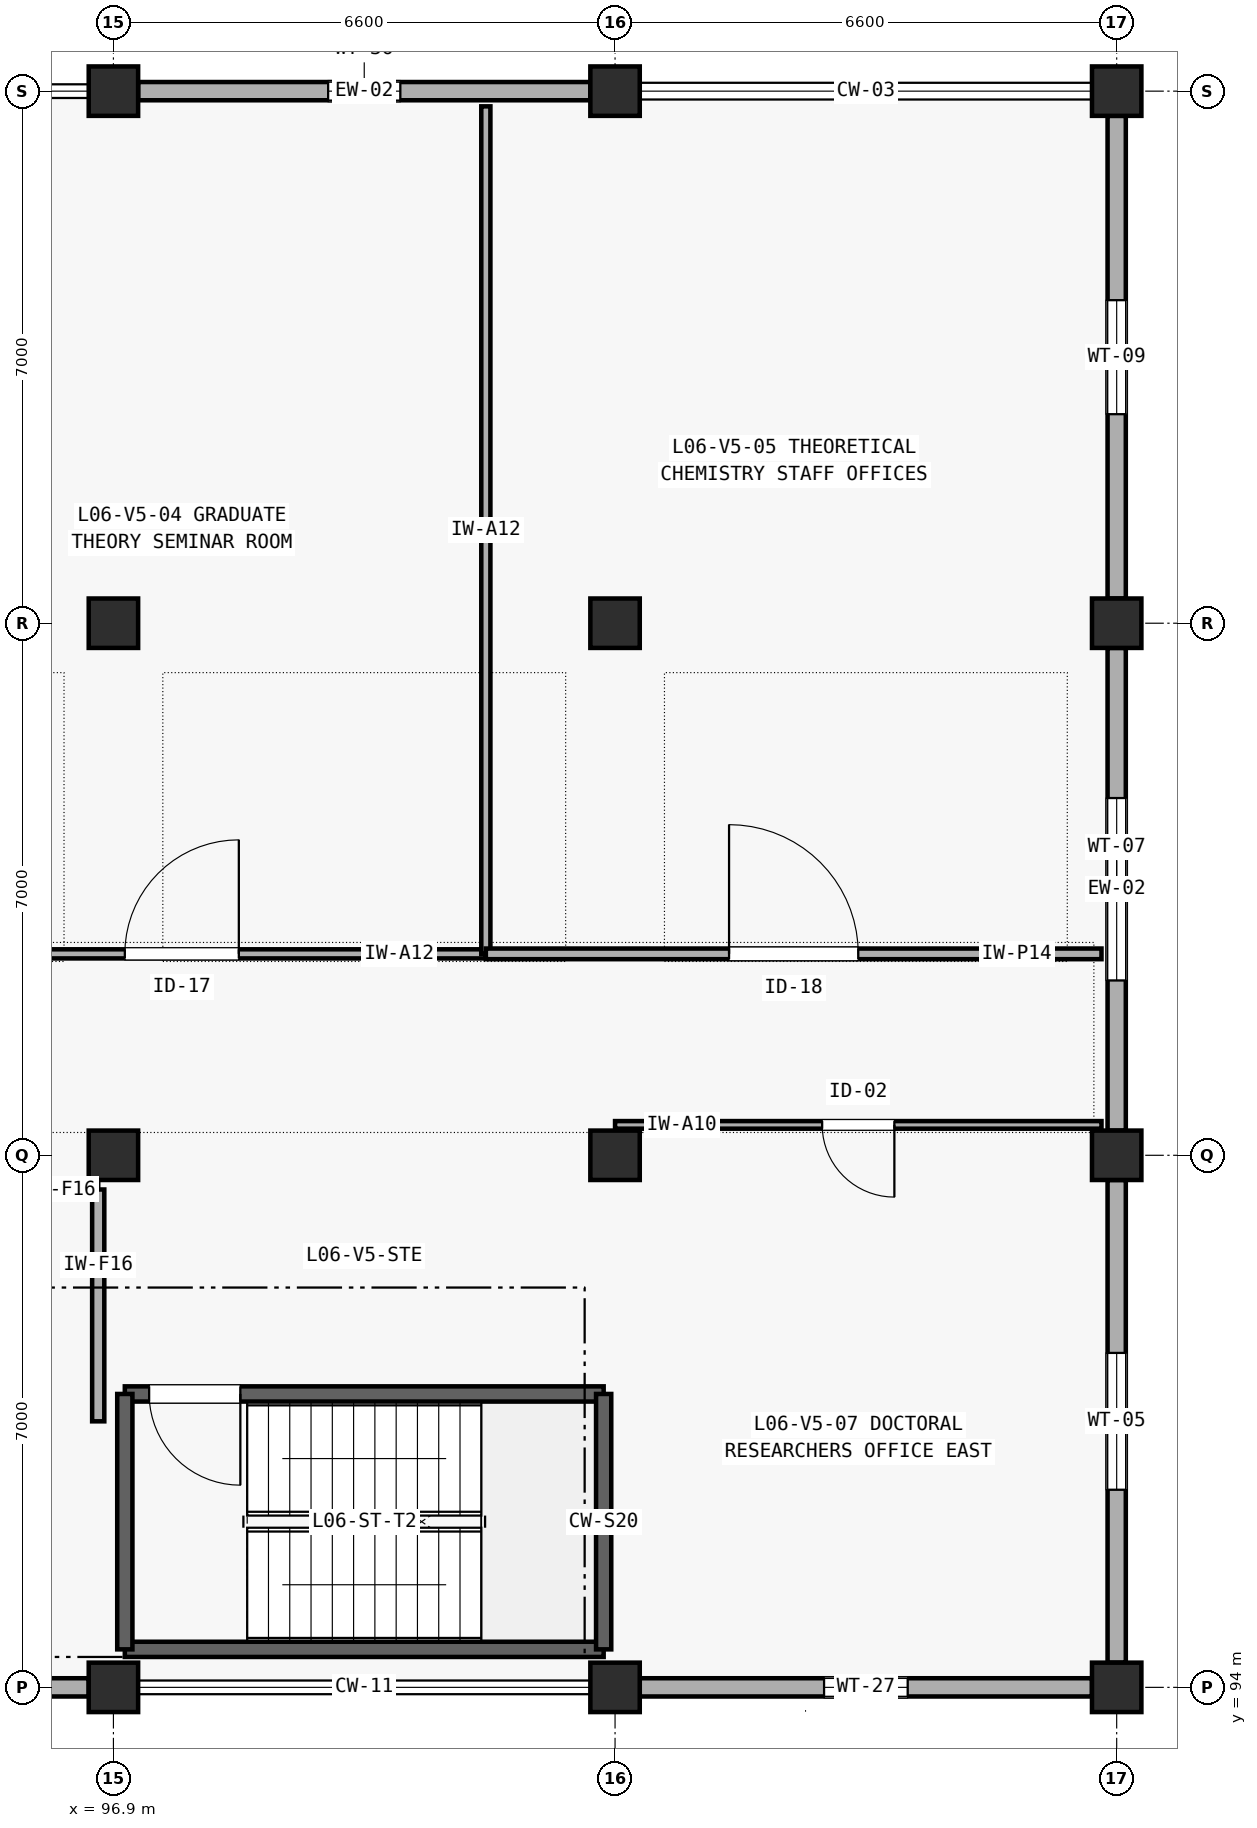
"""IFC4 building model, lengths in metres.
Left out: names, types, materials, properties, quantities, classifications, styles, units other than length and angle.
Written with IfcOpenShell. Run it as: python <this file> out.ifc"""

import sys

from ifc_helpers import new_model, si_unit, direction, frame, frame_2d, origin, origin_2d, place, context, subcontext, project, spatial, rectangle, extrude, element, fill, save


model = new_model("IFC4")
c1 = context("Model", 3, precision=1e-05, world=origin(), true_north=direction((0.0, 1.0)))
c2 = subcontext(c1, "Body", "Model", "MODEL_VIEW")
j1 = project(units=[si_unit("LENGTHUNIT", "METRE"), si_unit("PLANEANGLEUNIT", "RADIAN")], contexts=[c1])
p1 = place(None, origin())
s1 = spatial("IfcSite", under=j1, at=p1, CompositionType="ELEMENT")
p2 = place(p1, origin())
s2 = spatial("IfcBuilding", under=s1, at=p2, CompositionType="ELEMENT")
p3 = place(p2, frame((0.0, 0.0, 25.2)))
s3 = spatial("IfcBuildingStorey", under=s2, at=p3, CompositionType="ELEMENT", Elevation=25.2)
for number, where, z_axis, x_axis in (
    (1, (96.9, 94.0, 0.0), (0.0, 0.0, 1.0), (1.0, 0.0, 0.0)),
    (2, (96.9, 101.0, 0.0), (0.0, 0.0, 1.0), (1.0, 0.0, 0.0)),
    (3, (96.9, 108.0, 0.0), (0.0, 0.0, 1.0), (1.0, 0.0, 0.0)),
    (4, (96.9, 115.0, 0.0), (0.0, 0.0, 1.0), (1.0, 0.0, 0.0)),
    (5, (103.5, 94.0, 0.0), (0.0, 0.0, 1.0), (1.0, 0.0, 0.0)),
    (6, (103.5, 101.0, 0.0), (0.0, 0.0, 1.0), (1.0, 0.0, 0.0)),
    (7, (103.5, 108.0, 0.0), (0.0, 0.0, 1.0), (1.0, 0.0, 0.0)),
    (8, (103.5, 115.0, 0.0), (0.0, 0.0, 1.0), (1.0, 0.0, 0.0)),
    (9, (110.1, 94.0, 0.0), (0.0, 0.0, 1.0), (1.0, 0.0, 0.0)),
    (10, (110.1, 101.0, 0.0), (0.0, 0.0, 1.0), (1.0, 0.0, 0.0)),
    (11, (110.1, 108.0, 0.0), (0.0, 0.0, 1.0), (1.0, 0.0, 0.0)),
    (12, (110.1, 115.0, 0.0), (0.0, 0.0, 1.0), (1.0, 0.0, 0.0)),
):
    element("IfcColumn", number, at=place(p3, frame(where, z_axis=z_axis, x_axis=x_axis)), inside=s3, PredefinedType="COLUMN", context=c2, shape_type="SweptSolid", body=[
        extrude(rectangle(XDim=0.65, YDim=0.65, at=origin_2d()), origin(), (0.0, 0.0, 1.0), 4.2),
    ])
p4 = place(p3, frame((90.625, 94.0, 0.0), z_axis=(0.0, 0.0, 1.0), x_axis=(1.0, 0.0, 0.0)))
e13 = element("IfcWall", 13, at=p4, inside=s3, PredefinedType="SOLIDWALL", context=c2, shape_type="SweptSolid", body=[
    extrude(rectangle(XDim=5.95, YDim=0.24, at=frame_2d((2.975, 0.0))), origin(), (0.0, 0.0, 1.0), 3.235),
])
p5 = place(p4, frame((1.625, 0.0, 0.85)))
e14 = element("IfcOpeningElement", 14, at=p5, cuts=e13, PredefinedType="OPENING", context=c2, shape_type="SweptSolid", body=[
    extrude(rectangle(XDim=2.7, YDim=1.6, at=frame_2d((1.35, 0.8))), frame((0.0, 0.13, 0.0), z_axis=(0.0, -1.0, 0.0), x_axis=(1.0, 0.0, 0.0)), (0.0, 0.0, 1.0), 0.26),
])
p6 = place(p3, frame((103.825, 94.0, 0.0), z_axis=(0.0, 0.0, 1.0), x_axis=(1.0, 0.0, 0.0)))
e15 = element("IfcWall", 15, at=p6, inside=s3, PredefinedType="SOLIDWALL", context=c2, shape_type="SweptSolid", body=[
    extrude(rectangle(XDim=5.95, YDim=0.24, at=frame_2d((2.975, 0.0))), origin(), (0.0, 0.0, 1.0), 3.365),
])
p7 = place(p6, frame((2.425, 0.0, 0.85)))
e16 = element("IfcOpeningElement", 16, at=p7, cuts=e15, PredefinedType="OPENING", context=c2, shape_type="SweptSolid", body=[
    extrude(rectangle(XDim=1.1, YDim=1.45, at=frame_2d((0.55, 0.725))), frame((0.0, 0.13, 0.0), z_axis=(0.0, -1.0, 0.0), x_axis=(1.0, 0.0, 0.0)), (0.0, 0.0, 1.0), 0.26),
])
p8 = place(p3, frame((97.225, 115.0, 0.0), z_axis=(0.0, 0.0, 1.0), x_axis=(1.0, 0.0, 0.0)))
e17 = element("IfcWall", 17, at=p8, inside=s3, PredefinedType="SOLIDWALL", context=c2, shape_type="SweptSolid", body=[
    extrude(rectangle(XDim=5.95, YDim=0.24, at=frame_2d((2.975, 0.0))), origin(), (0.0, 0.0, 1.0), 3.285),
])
p9 = place(p8, frame((2.5, 0.0, 0.85)))
e18 = element("IfcOpeningElement", 18, at=p9, cuts=e17, PredefinedType="OPENING", context=c2, shape_type="SweptSolid", body=[
    extrude(rectangle(XDim=0.95, YDim=1.55, at=frame_2d((0.475, 0.775))), frame((0.0, 0.13, 0.0), z_axis=(0.0, -1.0, 0.0), x_axis=(1.0, 0.0, 0.0)), (0.0, 0.0, 1.0), 0.26),
])
p10 = place(p3, frame((110.1, 94.325, 0.0), z_axis=(0.0, 0.0, 1.0), x_axis=(0.0, 1.0, 0.0)))
e19 = element("IfcWall", 19, at=p10, inside=s3, PredefinedType="SOLIDWALL", context=c2, shape_type="SweptSolid", body=[
    extrude(rectangle(XDim=6.35, YDim=0.24, at=frame_2d((3.175, 0.0))), origin(), (0.0, 0.0, 1.0), 3.565),
])
p11 = place(p10, frame((2.275, 0.0, 0.85)))
e20 = element("IfcOpeningElement", 20, at=p11, cuts=e19, PredefinedType="OPENING", context=c2, shape_type="SweptSolid", body=[
    extrude(rectangle(XDim=1.8, YDim=1.35, at=frame_2d((0.9, 0.675))), frame((0.0, 0.13, 0.0), z_axis=(0.0, -1.0, 0.0), x_axis=(1.0, 0.0, 0.0)), (0.0, 0.0, 1.0), 0.26),
])
p12 = place(p3, frame((110.1, 101.325, 0.0), z_axis=(0.0, 0.0, 1.0), x_axis=(0.0, 1.0, 0.0)))
e21 = element("IfcWall", 21, at=p12, inside=s3, PredefinedType="SOLIDWALL", context=c2, shape_type="SweptSolid", body=[
    extrude(rectangle(XDim=6.35, YDim=0.24, at=frame_2d((3.175, 0.0))), origin(), (0.0, 0.0, 1.0), 3.565),
])
p13 = place(p12, frame((1.975, 0.0, 0.85)))
e22 = element("IfcOpeningElement", 22, at=p13, cuts=e21, PredefinedType="OPENING", context=c2, shape_type="SweptSolid", body=[
    extrude(rectangle(XDim=2.4, YDim=1.35, at=frame_2d((1.2, 0.675))), frame((0.0, 0.13, 0.0), z_axis=(0.0, -1.0, 0.0), x_axis=(1.0, 0.0, 0.0)), (0.0, 0.0, 1.0), 0.26),
])
p14 = place(p3, frame((110.1, 108.325, 0.0), z_axis=(0.0, 0.0, 1.0), x_axis=(0.0, 1.0, 0.0)))
e23 = element("IfcWall", 23, at=p14, inside=s3, PredefinedType="SOLIDWALL", context=c2, shape_type="SweptSolid", body=[
    extrude(rectangle(XDim=6.35, YDim=0.24, at=frame_2d((3.175, 0.0))), origin(), (0.0, 0.0, 1.0), 3.565),
])
p15 = place(p14, frame((2.425, 0.0, 0.85)))
e24 = element("IfcOpeningElement", 24, at=p15, cuts=e23, PredefinedType="OPENING", context=c2, shape_type="SweptSolid", body=[
    extrude(rectangle(XDim=1.5, YDim=1.5, at=frame_2d((0.75, 0.75))), frame((0.0, 0.13, 0.0), z_axis=(0.0, -1.0, 0.0), x_axis=(1.0, 0.0, 0.0)), (0.0, 0.0, 1.0), 0.26),
])
p16 = place(p3, frame((97.05, 94.5, 0.0), z_axis=(0.0, 0.0, 1.0), x_axis=(1.0, 0.0, 0.0)))
e25 = element("IfcWall", 25, at=p16, inside=s3, PredefinedType="SHEAR", context=c2, shape_type="SweptSolid", body=[
    extrude(rectangle(XDim=6.3, YDim=0.2, at=frame_2d((3.15, 0.0))), origin(), (0.0, 0.0, 1.0), 4.2),
])
p17 = place(p3, frame((97.05, 97.86, 0.0), z_axis=(0.0, 0.0, 1.0), x_axis=(1.0, 0.0, 0.0)))
e26 = element("IfcWall", 26, at=p17, inside=s3, PredefinedType="SHEAR", context=c2, shape_type="SweptSolid", body=[
    extrude(rectangle(XDim=6.3, YDim=0.2, at=frame_2d((3.15, 0.0))), origin(), (0.0, 0.0, 1.0), 4.2),
])
p18 = place(p17, frame((0.32, 0.0, 0.0)))
e27 = element("IfcOpeningElement", 27, at=p18, cuts=e26, PredefinedType="OPENING", context=c2, shape_type="SweptSolid", body=[
    extrude(rectangle(XDim=1.2, YDim=2.15, at=frame_2d((0.6, 1.075))), frame((0.0, 0.11, 0.0), z_axis=(0.0, -1.0, 0.0), x_axis=(1.0, 0.0, 0.0)), (0.0, 0.0, 1.0), 0.22),
])
for number, where, z_axis, x_axis in (
    (28, (97.05, 94.5, 0.0), (0.0, 0.0, 1.0), (0.0, 1.0, 0.0)),
    (29, (103.35, 94.5, 0.0), (0.0, 0.0, 1.0), (0.0, 1.0, 0.0)),
):
    element("IfcWall", number, at=place(p3, frame(where, z_axis=z_axis, x_axis=x_axis)), inside=s3, PredefinedType="SHEAR", context=c2, shape_type="SweptSolid", body=[
        extrude(rectangle(XDim=3.36, YDim=0.2, at=frame_2d((1.68, 0.0))), origin(), (0.0, 0.0, 1.0), 4.2),
    ])
p19 = place(p3, frame((91.5, 100.55, 0.0), z_axis=(0.0, 0.0, 1.0), x_axis=(1.0, 0.0, 0.0)))
e30 = element("IfcWall", 30, at=p19, inside=s3, PredefinedType="SOLIDWALL", context=c2, shape_type="SweptSolid", body=[
    extrude(rectangle(XDim=5.2, YDim=0.16, at=frame_2d((2.6, 0.0))), origin(), (0.0, 0.0, 1.0), 3.9),
])
p20 = place(p19, frame((1.95, 0.0, 0.0)))
e31 = element("IfcOpeningElement", 31, at=p20, cuts=e30, PredefinedType="OPENING", context=c2, shape_type="SweptSolid", body=[
    extrude(rectangle(XDim=1.3, YDim=2.15, at=frame_2d((0.65, 1.075))), frame((0.0, 0.09, 0.0), z_axis=(0.0, -1.0, 0.0), x_axis=(1.0, 0.0, 0.0)), (0.0, 0.0, 1.0), 0.18),
])
p21 = place(p3, frame((96.7, 97.5, 0.0), z_axis=(0.0, 0.0, 1.0), x_axis=(0.0, 1.0, 0.0)))
e32 = element("IfcWall", 32, at=p21, inside=s3, PredefinedType="SOLIDWALL", context=c2, shape_type="SweptSolid", body=[
    extrude(rectangle(XDim=3.05, YDim=0.16, at=frame_2d((1.525, 0.0))), origin(), (0.0, 0.0, 1.0), 3.405),
])
p22 = place(p3, frame((93.8, 103.65, 0.0), z_axis=(0.0, 0.0, 1.0), x_axis=(1.0, 0.0, 0.0)))
e33 = element("IfcWall", 33, at=p22, inside=s3, PredefinedType="PARTITIONING", context=c2, shape_type="SweptSolid", body=[
    extrude(rectangle(XDim=8.0, YDim=0.12, at=frame_2d((4.0, 0.0))), origin(), (0.0, 0.0, 1.0), 3.9),
])
p23 = place(p22, frame((3.25, 0.0, 0.0)))
e34 = element("IfcOpeningElement", 34, at=p23, cuts=e33, PredefinedType="OPENING", context=c2, shape_type="SweptSolid", body=[
    extrude(rectangle(XDim=1.5, YDim=2.15, at=frame_2d((0.75, 1.075))), frame((0.0, 0.07, 0.0), z_axis=(0.0, -1.0, 0.0), x_axis=(1.0, 0.0, 0.0)), (0.0, 0.0, 1.0), 0.14),
])
p24 = place(p3, frame((101.8, 103.65, 0.0), z_axis=(0.0, 0.0, 1.0), x_axis=(0.0, 1.0, 0.0)))
e35 = element("IfcWall", 35, at=p24, inside=s3, PredefinedType="PARTITIONING", context=c2, shape_type="SweptSolid", body=[
    extrude(rectangle(XDim=11.15, YDim=0.12, at=frame_2d((5.575, 0.0))), origin(), (0.0, 0.0, 1.0), 3.9),
])
p25 = place(p3, frame((101.8, 103.65, 0.0), z_axis=(0.0, 0.0, 1.0), x_axis=(1.0, 0.0, 0.0)))
e36 = element("IfcWall", 36, at=p25, inside=s3, PredefinedType="PLUMBINGWALL", context=c2, shape_type="SweptSolid", body=[
    extrude(rectangle(XDim=8.1, YDim=0.14, at=frame_2d((4.05, 0.0))), origin(), (0.0, 0.0, 1.0), 3.9),
])
p26 = place(p25, frame((3.2, 0.0, 0.0)))
e37 = element("IfcOpeningElement", 37, at=p26, cuts=e36, PredefinedType="OPENING", context=c2, shape_type="SweptSolid", body=[
    extrude(rectangle(XDim=1.7, YDim=2.2, at=frame_2d((0.85, 1.1))), frame((0.0, 0.08, 0.0), z_axis=(0.0, -1.0, 0.0), x_axis=(1.0, 0.0, 0.0)), (0.0, 0.0, 1.0), 0.16),
])
p27 = place(p3, frame((103.5, 101.4, 0.0), z_axis=(0.0, 0.0, 1.0), x_axis=(1.0, 0.0, 0.0)))
e38 = element("IfcWall", 38, at=p27, inside=s3, PredefinedType="PARTITIONING", context=c2, shape_type="SweptSolid", body=[
    extrude(rectangle(XDim=6.4, YDim=0.1, at=frame_2d((3.2, 0.0))), origin(), (0.0, 0.0, 1.0), 3.9),
])
p28 = place(p27, frame((2.725, 0.0, 0.0)))
e39 = element("IfcOpeningElement", 39, at=p28, cuts=e38, PredefinedType="OPENING", context=c2, shape_type="SweptSolid", body=[
    extrude(rectangle(XDim=0.95, YDim=2.1, at=frame_2d((0.475, 1.05))), frame((0.0, 0.06, 0.0), z_axis=(0.0, -1.0, 0.0), x_axis=(1.0, 0.0, 0.0)), (0.0, 0.0, 1.0), 0.12),
])
p29 = place(p7, origin())
e40 = element("IfcWindow", 40, at=p29, inside=s3, PartitioningType="SINGLE_PANEL", PredefinedType="WINDOW", context=c2, shape_type="SweptSolid", body=[
    extrude(rectangle(XDim=1.1, YDim=1.45, at=frame_2d((0.55, 0.725))), frame((0.0, 0.03, 0.0), z_axis=(0.0, -1.0, 0.0), x_axis=(1.0, 0.0, 0.0)), (0.0, 0.0, 1.0), 0.06),
])
fill(e16, e40)
p30 = place(p9, origin())
e41 = element("IfcWindow", 41, at=p30, inside=s3, PartitioningType="SINGLE_PANEL", PredefinedType="WINDOW", context=c2, shape_type="SweptSolid", body=[
    extrude(rectangle(XDim=0.95, YDim=1.55, at=frame_2d((0.475, 0.775))), frame((0.0, 0.03, 0.0), z_axis=(0.0, -1.0, 0.0), x_axis=(1.0, 0.0, 0.0)), (0.0, 0.0, 1.0), 0.06),
])
fill(e18, e41)
p31 = place(p11, origin())
e42 = element("IfcWindow", 42, at=p31, inside=s3, PartitioningType="SINGLE_PANEL", PredefinedType="WINDOW", context=c2, shape_type="SweptSolid", body=[
    extrude(rectangle(XDim=1.8, YDim=1.35, at=frame_2d((0.9, 0.675))), frame((0.0, 0.03, 0.0), z_axis=(0.0, -1.0, 0.0), x_axis=(1.0, 0.0, 0.0)), (0.0, 0.0, 1.0), 0.06),
])
fill(e20, e42)
p32 = place(p13, origin())
e43 = element("IfcWindow", 43, at=p32, inside=s3, PartitioningType="SINGLE_PANEL", PredefinedType="WINDOW", context=c2, shape_type="SweptSolid", body=[
    extrude(rectangle(XDim=2.4, YDim=1.35, at=frame_2d((1.2, 0.675))), frame((0.0, 0.03, 0.0), z_axis=(0.0, -1.0, 0.0), x_axis=(1.0, 0.0, 0.0)), (0.0, 0.0, 1.0), 0.06),
])
fill(e22, e43)
p33 = place(p15, origin())
e44 = element("IfcWindow", 44, at=p33, inside=s3, PartitioningType="SINGLE_PANEL", PredefinedType="WINDOW", context=c2, shape_type="SweptSolid", body=[
    extrude(rectangle(XDim=1.5, YDim=1.5, at=frame_2d((0.75, 0.75))), frame((0.0, 0.03, 0.0), z_axis=(0.0, -1.0, 0.0), x_axis=(1.0, 0.0, 0.0)), (0.0, 0.0, 1.0), 0.06),
])
fill(e24, e44)
p34 = place(p18, frame((1.2, 0.0, 0.0), z_axis=(0.0, 0.0, 1.0), x_axis=(-1.0, 0.0, 0.0)))
e45 = element("IfcDoor", 45, at=p34, inside=s3, OperationType="SINGLE_SWING_LEFT", PredefinedType="DOOR", context=c2, shape_type="SweptSolid", body=[
    extrude(rectangle(XDim=1.2, YDim=2.15, at=frame_2d((0.6, 1.075))), frame((0.0, 0.025, 0.0), z_axis=(0.0, -1.0, 0.0), x_axis=(1.0, 0.0, 0.0)), (0.0, 0.0, 1.0), 0.05),
])
fill(e27, e45)
p35 = place(p23, origin())
e46 = element("IfcDoor", 46, at=p35, inside=s3, OperationType="SINGLE_SWING_RIGHT", PredefinedType="DOOR", context=c2, shape_type="SweptSolid", body=[
    extrude(rectangle(XDim=1.5, YDim=2.15, at=frame_2d((0.75, 1.075))), frame((0.0, 0.025, 0.0), z_axis=(0.0, -1.0, 0.0), x_axis=(1.0, 0.0, 0.0)), (0.0, 0.0, 1.0), 0.05),
])
fill(e34, e46)
p36 = place(p26, origin())
e47 = element("IfcDoor", 47, at=p36, inside=s3, OperationType="SINGLE_SWING_LEFT", PredefinedType="DOOR", context=c2, shape_type="SweptSolid", body=[
    extrude(rectangle(XDim=1.7, YDim=2.2, at=frame_2d((0.85, 1.1))), frame((0.0, 0.025, 0.0), z_axis=(0.0, -1.0, 0.0), x_axis=(1.0, 0.0, 0.0)), (0.0, 0.0, 1.0), 0.05),
])
fill(e37, e47)
p37 = place(p28, frame((0.95, 0.0, 0.0), z_axis=(0.0, 0.0, 1.0), x_axis=(-1.0, 0.0, 0.0)))
e48 = element("IfcDoor", 48, at=p37, inside=s3, OperationType="SINGLE_SWING_LEFT", PredefinedType="DOOR", context=c2, shape_type="SweptSolid", body=[
    extrude(rectangle(XDim=0.95, YDim=2.1, at=frame_2d((0.475, 1.05))), frame((0.0, 0.025, 0.0), z_axis=(0.0, -1.0, 0.0), x_axis=(1.0, 0.0, 0.0)), (0.0, 0.0, 1.0), 0.05),
])
fill(e39, e48)
save(model, sys.argv[1])
